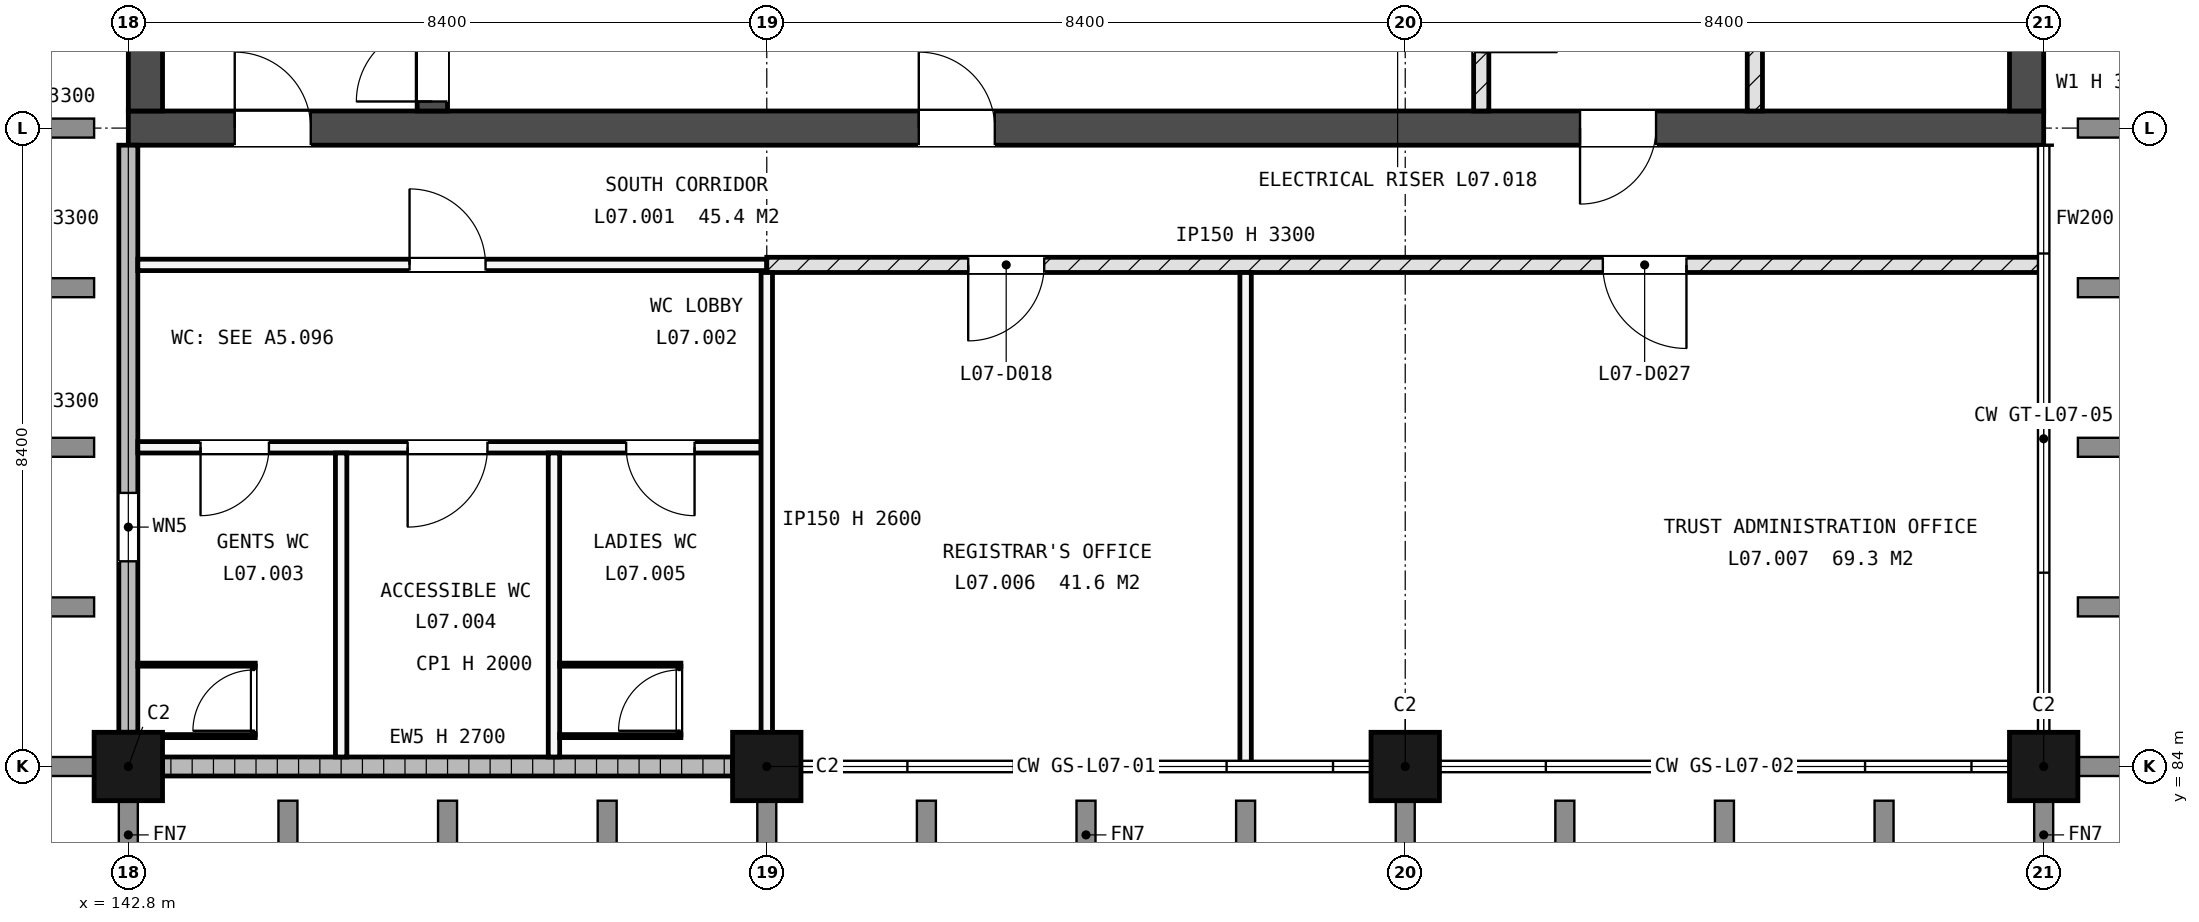
"""IFC4 building model, lengths in metres.
Left out: names, types, materials, properties, quantities, classifications, styles, units other than length and angle.
Written with IfcOpenShell. Run it as: python <this file> out.ifc"""

import sys

from ifc_helpers import new_model, si_unit, direction, frame, frame_2d, origin, origin_2d, place, context, subcontext, project, spatial, rectangle, extrude, element, fill, save


model = new_model("IFC4")
c1 = context("Model", 3, precision=1e-05, world=origin(), true_north=direction((0.0, 1.0)))
c2 = subcontext(c1, "Body", "Model", "MODEL_VIEW")
j1 = project(units=[si_unit("LENGTHUNIT", "METRE"), si_unit("PLANEANGLEUNIT", "RADIAN")], contexts=[c1])
p1 = place(None, origin())
s1 = spatial("IfcSite", under=j1, at=p1, CompositionType="ELEMENT")
p2 = place(p1, origin())
s2 = spatial("IfcBuilding", under=s1, at=p2, CompositionType="ELEMENT")
p3 = place(p2, frame((0.0, 0.0, 28.8)))
s3 = spatial("IfcBuildingStorey", under=s2, at=p3, CompositionType="ELEMENT", Elevation=28.8)
for number, where, z_axis, x_axis in (
    (1, (142.8, 84.0, -0.25), (0.0, 0.0, 1.0), (1.0, 0.0, 0.0)),
    (2, (151.2, 84.0, -0.25), (0.0, 0.0, 1.0), (1.0, 0.0, 0.0)),
    (3, (159.6, 84.0, -0.25), (0.0, 0.0, 1.0), (1.0, 0.0, 0.0)),
    (4, (168.0, 84.0, -0.25), (0.0, 0.0, 1.0), (1.0, 0.0, 0.0)),
):
    element("IfcColumn", number, at=place(p3, frame(where, z_axis=z_axis, x_axis=x_axis)), inside=s3, PredefinedType="COLUMN", context=c2, shape_type="SweptSolid", body=[
        extrude(rectangle(XDim=0.9, YDim=0.9, at=origin_2d()), origin(), (0.0, 0.0, 1.0), 3.6),
    ])
p4 = place(p3, frame((142.8, 92.4, -0.25), z_axis=(0.0, 0.0, 1.0), x_axis=(1.0, 0.0, 0.0)))
e5 = element("IfcWall", 5, at=p4, inside=s3, PredefinedType="SHEAR", context=c2, shape_type="SweptSolid", body=[
    extrude(rectangle(XDim=25.2, YDim=0.45, at=frame_2d((12.6, 0.0))), origin(), (0.0, 0.0, 1.0), 3.6),
])
p5 = place(p4, frame((1.4, 0.0, 0.25)))
e6 = element("IfcOpeningElement", 6, at=p5, cuts=e5, PredefinedType="OPENING", context=c2, shape_type="SweptSolid", body=[
    extrude(rectangle(XDim=1.0, YDim=2.1, at=frame_2d((0.5, 1.05))), frame((0.0, 0.235, 0.0), z_axis=(0.0, -1.0, 0.0), x_axis=(1.0, 0.0, 0.0)), (0.0, 0.0, 1.0), 0.47),
])
p6 = place(p4, frame((19.1, 0.0, 0.25)))
e7 = element("IfcOpeningElement", 7, at=p6, cuts=e5, PredefinedType="OPENING", context=c2, shape_type="SweptSolid", body=[
    extrude(rectangle(XDim=1.0, YDim=2.1, at=frame_2d((0.5, 1.05))), frame((0.0, 0.235, 0.0), z_axis=(0.0, -1.0, 0.0), x_axis=(1.0, 0.0, 0.0)), (0.0, 0.0, 1.0), 0.47),
])
p7 = place(p4, frame((10.4, 0.0, 0.25)))
e8 = element("IfcOpeningElement", 8, at=p7, cuts=e5, PredefinedType="OPENING", context=c2, shape_type="SweptSolid", body=[
    extrude(rectangle(XDim=1.0, YDim=2.1, at=frame_2d((0.5, 1.05))), frame((0.0, 0.235, 0.0), z_axis=(0.0, -1.0, 0.0), x_axis=(1.0, 0.0, 0.0)), (0.0, 0.0, 1.0), 0.47),
])
p8 = place(p3, frame((143.025, 92.625, -0.25), z_axis=(0.0, 0.0, 1.0), x_axis=(0.0, 1.0, 0.0)))
e9 = element("IfcWall", 9, at=p8, inside=s3, PredefinedType="SHEAR", context=c2, shape_type="SweptSolid", body=[
    extrude(rectangle(XDim=16.35, YDim=0.45, at=frame_2d((8.175, 0.0))), origin(), (0.0, 0.0, 1.0), 3.6),
])
p9 = place(p8, frame((2.975, 0.0, 1.85)))
e10 = element("IfcOpeningElement", 10, at=p9, cuts=e9, PredefinedType="OPENING", context=c2, shape_type="SweptSolid", body=[
    extrude(rectangle(XDim=1.2, YDim=0.9, at=frame_2d((0.6, 0.45))), frame((0.0, 0.235, 0.0), z_axis=(0.0, -1.0, 0.0), x_axis=(1.0, 0.0, 0.0)), (0.0, 0.0, 1.0), 0.47),
])
p10 = place(p3, frame((167.775, 92.625, -0.25), z_axis=(0.0, 0.0, 1.0), x_axis=(0.0, 1.0, 0.0)))
e11 = element("IfcWall", 11, at=p10, inside=s3, PredefinedType="SHEAR", context=c2, shape_type="SweptSolid", body=[
    extrude(rectangle(XDim=16.35, YDim=0.45, at=frame_2d((8.175, 0.0))), origin(), (0.0, 0.0, 1.0), 3.6),
])
p11 = place(p10, frame((12.175, 0.0, 1.85)))
e12 = element("IfcOpeningElement", 12, at=p11, cuts=e11, PredefinedType="OPENING", context=c2, shape_type="SweptSolid", body=[
    extrude(rectangle(XDim=1.2, YDim=0.9, at=frame_2d((0.6, 0.45))), frame((0.0, 0.235, 0.0), z_axis=(0.0, -1.0, 0.0), x_axis=(1.0, 0.0, 0.0)), (0.0, 0.0, 1.0), 0.47),
])
p12 = place(p3, frame((146.8, 92.625, -0.25), z_axis=(0.0, 0.0, 1.0), x_axis=(0.0, 1.0, 0.0)))
e13 = element("IfcWall", 13, at=p12, inside=s3, PredefinedType="SHEAR", context=c2, shape_type="SweptSolid", body=[
    extrude(rectangle(XDim=7.5, YDim=0.4, at=frame_2d((3.75, 0.0))), origin(), (0.0, 0.0, 1.0), 3.6),
])
p13 = place(p12, frame((0.125, 0.0, 0.25)))
e14 = element("IfcOpeningElement", 14, at=p13, cuts=e13, PredefinedType="OPENING", context=c2, shape_type="SweptSolid", body=[
    extrude(rectangle(XDim=1.0, YDim=2.1, at=frame_2d((0.5, 1.05))), frame((0.0, 0.21, 0.0), z_axis=(0.0, -1.0, 0.0), x_axis=(1.0, 0.0, 0.0)), (0.0, 0.0, 1.0), 0.42),
])
p14 = place(p3, frame((143.25, 84.0, 0.0), z_axis=(0.0, 0.0, 1.0), x_axis=(1.0, 0.0, 0.0)))
e15 = element("IfcWall", 15, at=p14, inside=s3, PredefinedType="STANDARD", context=c2, shape_type="SweptSolid", body=[
    extrude(rectangle(XDim=7.5, YDim=0.25, at=frame_2d((3.75, 0.0))), origin(), (0.0, 0.0, 1.0), 2.7),
])
p15 = place(p3, frame((142.8, 84.45, 0.0), z_axis=(0.0, 0.0, 1.0), x_axis=(0.0, 1.0, 0.0)))
e16 = element("IfcWall", 16, at=p15, inside=s3, PredefinedType="STANDARD", context=c2, shape_type="SweptSolid", body=[
    extrude(rectangle(XDim=7.725, YDim=0.25, at=frame_2d((3.863, 0.0))), origin(), (0.0, 0.0, 1.0), 3.3),
])
p16 = place(p15, frame((2.25, 0.0, 2.1)))
e17 = element("IfcOpeningElement", 17, at=p16, cuts=e16, PredefinedType="OPENING", context=c2, shape_type="SweptSolid", body=[
    extrude(rectangle(XDim=0.9, YDim=0.6, at=frame_2d((0.45, 0.3))), frame((0.0, 0.135, 0.0), z_axis=(0.0, -1.0, 0.0), x_axis=(1.0, 0.0, 0.0)), (0.0, 0.0, 1.0), 0.27),
])
p17 = place(p3, frame((142.925, 88.2, 0.0), z_axis=(0.0, 0.0, 1.0), x_axis=(1.0, 0.0, 0.0)))
e18 = element("IfcWall", 18, at=p17, inside=s3, PredefinedType="PARTITIONING", context=c2, shape_type="SweptSolid", body=[
    extrude(rectangle(XDim=8.2, YDim=0.15, at=frame_2d((4.1, 0.0))), origin(), (0.0, 0.0, 1.0), 3.3),
])
p18 = place(p17, frame((0.825, 0.0, 0.0)))
e19 = element("IfcOpeningElement", 19, at=p18, cuts=e18, PredefinedType="OPENING", context=c2, shape_type="SweptSolid", body=[
    extrude(rectangle(XDim=0.9, YDim=2.1, at=frame_2d((0.45, 1.05))), frame((0.0, 0.085, 0.0), z_axis=(0.0, -1.0, 0.0), x_axis=(1.0, 0.0, 0.0)), (0.0, 0.0, 1.0), 0.17),
])
p19 = place(p17, frame((3.55, 0.0, 0.0)))
e20 = element("IfcOpeningElement", 20, at=p19, cuts=e18, PredefinedType="OPENING", context=c2, shape_type="SweptSolid", body=[
    extrude(rectangle(XDim=1.05, YDim=2.25, at=frame_2d((0.525, 1.125))), frame((0.0, 0.085, 0.0), z_axis=(0.0, -1.0, 0.0), x_axis=(1.0, 0.0, 0.0)), (0.0, 0.0, 1.0), 0.17),
])
p20 = place(p17, frame((6.425, 0.0, 0.0)))
e21 = element("IfcOpeningElement", 21, at=p20, cuts=e18, PredefinedType="OPENING", context=c2, shape_type="SweptSolid", body=[
    extrude(rectangle(XDim=0.9, YDim=2.1, at=frame_2d((0.45, 1.05))), frame((0.0, 0.085, 0.0), z_axis=(0.0, -1.0, 0.0), x_axis=(1.0, 0.0, 0.0)), (0.0, 0.0, 1.0), 0.17),
])
p21 = place(p3, frame((142.925, 90.6, 0.0), z_axis=(0.0, 0.0, 1.0), x_axis=(1.0, 0.0, 0.0)))
e22 = element("IfcWall", 22, at=p21, inside=s3, PredefinedType="PARTITIONING", context=c2, shape_type="SweptSolid", body=[
    extrude(rectangle(XDim=8.275, YDim=0.15, at=frame_2d((4.137, 0.0))), origin(), (0.0, 0.0, 1.0), 3.3),
])
p22 = place(p21, frame((3.575, 0.0, 0.0)))
e23 = element("IfcOpeningElement", 23, at=p22, cuts=e22, PredefinedType="OPENING", context=c2, shape_type="SweptSolid", body=[
    extrude(rectangle(XDim=1.0, YDim=2.1, at=frame_2d((0.5, 1.05))), frame((0.0, 0.085, 0.0), z_axis=(0.0, -1.0, 0.0), x_axis=(1.0, 0.0, 0.0)), (0.0, 0.0, 1.0), 0.17),
])
p23 = place(p3, frame((151.2, 90.6, 0.0), z_axis=(0.0, 0.0, 1.0), x_axis=(1.0, 0.0, 0.0)))
e24 = element("IfcWall", 24, at=p23, inside=s3, PredefinedType="SOLIDWALL", context=c2, shape_type="SweptSolid", body=[
    extrude(rectangle(XDim=16.8, YDim=0.2, at=frame_2d((8.4, 0.0))), origin(), (0.0, 0.0, 1.0), 3.3),
])
p24 = place(p23, frame((2.65, 0.0, 0.0)))
e25 = element("IfcOpeningElement", 25, at=p24, cuts=e24, PredefinedType="OPENING", context=c2, shape_type="SweptSolid", body=[
    extrude(rectangle(XDim=1.0, YDim=2.1, at=frame_2d((0.5, 1.05))), frame((0.0, 0.11, 0.0), z_axis=(0.0, -1.0, 0.0), x_axis=(1.0, 0.0, 0.0)), (0.0, 0.0, 1.0), 0.22),
])
p25 = place(p23, frame((11.0, 0.0, 0.0)))
e26 = element("IfcOpeningElement", 26, at=p25, cuts=e24, PredefinedType="OPENING", context=c2, shape_type="SweptSolid", body=[
    extrude(rectangle(XDim=1.1, YDim=2.25, at=frame_2d((0.55, 1.125))), frame((0.0, 0.11, 0.0), z_axis=(0.0, -1.0, 0.0), x_axis=(1.0, 0.0, 0.0)), (0.0, 0.0, 1.0), 0.22),
])
for number, where, z_axis, x_axis in (
    (27, (145.6, 84.125, 0.0), (0.0, 0.0, 1.0), (0.0, 1.0, 0.0)),
    (28, (148.4, 84.125, 0.0), (0.0, 0.0, 1.0), (0.0, 1.0, 0.0)),
):
    element("IfcWall", number, at=place(p3, frame(where, z_axis=z_axis, x_axis=x_axis)), inside=s3, PredefinedType="PARTITIONING", context=c2, shape_type="SweptSolid", body=[
        extrude(rectangle(XDim=4.0, YDim=0.15, at=frame_2d((2.0, 0.0))), origin(), (0.0, 0.0, 1.0), 3.3),
    ])
p26 = place(p3, frame((151.2, 84.0, 0.0), z_axis=(0.0, 0.0, 1.0), x_axis=(0.0, 1.0, 0.0)))
e29 = element("IfcWall", 29, at=p26, inside=s3, PredefinedType="PARTITIONING", context=c2, shape_type="SweptSolid", body=[
    extrude(rectangle(XDim=6.5, YDim=0.15, at=frame_2d((3.25, 0.0))), origin(), (0.0, 0.0, 1.0), 2.6),
])
p27 = place(p3, frame((157.5, 84.0, 0.0), z_axis=(0.0, 0.0, 1.0), x_axis=(0.0, 1.0, 0.0)))
e30 = element("IfcWall", 30, at=p27, inside=s3, PredefinedType="PARTITIONING", context=c2, shape_type="SweptSolid", body=[
    extrude(rectangle(XDim=6.5, YDim=0.15, at=frame_2d((3.25, 0.0))), origin(), (0.0, 0.0, 1.0), 3.3),
])
p28 = place(p3, frame((160.6, 92.625, 0.0), z_axis=(0.0, 0.0, 1.0), x_axis=(0.0, 1.0, 0.0)))
e31 = element("IfcWall", 31, at=p28, inside=s3, PredefinedType="SOLIDWALL", context=c2, shape_type="SweptSolid", body=[
    extrude(rectangle(XDim=12.475, YDim=0.2, at=frame_2d((6.238, 0.0))), origin(), (0.0, 0.0, 1.0), 3.3),
])
p29 = place(p28, frame((5.075, 0.0, 0.0)))
e32 = element("IfcOpeningElement", 32, at=p29, cuts=e31, PredefinedType="OPENING", context=c2, shape_type="SweptSolid", body=[
    extrude(rectangle(XDim=0.8, YDim=2.1, at=frame_2d((0.4, 1.05))), frame((0.0, 0.11, 0.0), z_axis=(0.0, -1.0, 0.0), x_axis=(1.0, 0.0, 0.0)), (0.0, 0.0, 1.0), 0.22),
])
p30 = place(p28, frame((0.775, 0.0, 0.0)))
e33 = element("IfcOpeningElement", 33, at=p30, cuts=e31, PredefinedType="OPENING", context=c2, shape_type="SweptSolid", body=[
    extrude(rectangle(XDim=1.0, YDim=2.1, at=frame_2d((0.5, 1.05))), frame((0.0, 0.11, 0.0), z_axis=(0.0, -1.0, 0.0), x_axis=(1.0, 0.0, 0.0)), (0.0, 0.0, 1.0), 0.22),
])
p31 = place(p3, frame((164.2, 92.625, 0.0), z_axis=(0.0, 0.0, 1.0), x_axis=(0.0, 1.0, 0.0)))
e34 = element("IfcWall", 34, at=p31, inside=s3, PredefinedType="SOLIDWALL", context=c2, shape_type="SweptSolid", body=[
    extrude(rectangle(XDim=8.725, YDim=0.2, at=frame_2d((4.363, 0.0))), origin(), (0.0, 0.0, 1.0), 3.3),
])
p32 = place(p31, frame((1.675, 0.0, 0.0)))
e35 = element("IfcOpeningElement", 35, at=p32, cuts=e34, PredefinedType="OPENING", context=c2, shape_type="SweptSolid", body=[
    extrude(rectangle(XDim=0.8, YDim=2.1, at=frame_2d((0.4, 1.05))), frame((0.0, 0.11, 0.0), z_axis=(0.0, -1.0, 0.0), x_axis=(1.0, 0.0, 0.0)), (0.0, 0.0, 1.0), 0.22),
])
p33 = place(p31, frame((6.275, 0.0, 0.0)))
e36 = element("IfcOpeningElement", 36, at=p33, cuts=e34, PredefinedType="OPENING", context=c2, shape_type="SweptSolid", body=[
    extrude(rectangle(XDim=0.8, YDim=2.1, at=frame_2d((0.4, 1.05))), frame((0.0, 0.11, 0.0), z_axis=(0.0, -1.0, 0.0), x_axis=(1.0, 0.0, 0.0)), (0.0, 0.0, 1.0), 0.22),
])
p34 = place(p3, frame((142.93, 84.4, 0.0), z_axis=(0.0, 0.0, 1.0), x_axis=(1.0, 0.0, 0.0)))
e37 = element("IfcWall", 37, at=p34, inside=s3, PredefinedType="PARTITIONING", context=c2, shape_type="SweptSolid", body=[
    extrude(rectangle(XDim=1.54, YDim=0.04, at=frame_2d((0.77, 0.0))), origin(), (0.0, 0.0, 1.0), 2.0),
])
p35 = place(p3, frame((142.925, 85.34, 0.0), z_axis=(0.0, 0.0, 1.0), x_axis=(1.0, 0.0, 0.0)))
e38 = element("IfcWall", 38, at=p35, inside=s3, PredefinedType="PARTITIONING", context=c2, shape_type="SweptSolid", body=[
    extrude(rectangle(XDim=1.545, YDim=0.04, at=frame_2d((0.772, 0.0))), origin(), (0.0, 0.0, 1.0), 2.0),
])
p36 = place(p3, frame((144.45, 84.42, 0.0), z_axis=(0.0, 0.0, 1.0), x_axis=(0.0, 1.0, 0.0)))
e39 = element("IfcWall", 39, at=p36, inside=s3, PredefinedType="PARTITIONING", context=c2, shape_type="SweptSolid", body=[
    extrude(rectangle(XDim=0.9, YDim=0.04, at=frame_2d((0.45, 0.0))), origin(), (0.0, 0.0, 1.0), 2.0),
])
p37 = place(p36, frame((0.05, 0.0, 0.0)))
e40 = element("IfcOpeningElement", 40, at=p37, cuts=e39, PredefinedType="OPENING", context=c2, shape_type="SweptSolid", body=[
    extrude(rectangle(XDim=0.8, YDim=2.0, at=frame_2d((0.4, 1.0))), frame((0.0, 0.03, 0.0), z_axis=(0.0, -1.0, 0.0), x_axis=(1.0, 0.0, 0.0)), (0.0, 0.0, 1.0), 0.06),
])
for number, where, z_axis, x_axis in (
    (41, (148.475, 84.4, 0.0), (0.0, 0.0, 1.0), (1.0, 0.0, 0.0)),
    (42, (148.475, 85.34, 0.0), (0.0, 0.0, 1.0), (1.0, 0.0, 0.0)),
):
    element("IfcWall", number, at=place(p3, frame(where, z_axis=z_axis, x_axis=x_axis)), inside=s3, PredefinedType="PARTITIONING", context=c2, shape_type="SweptSolid", body=[
        extrude(rectangle(XDim=1.595, YDim=0.04, at=frame_2d((0.797, 0.0))), origin(), (0.0, 0.0, 1.0), 2.0),
    ])
p38 = place(p3, frame((150.05, 84.42, 0.0), z_axis=(0.0, 0.0, 1.0), x_axis=(0.0, 1.0, 0.0)))
e43 = element("IfcWall", 43, at=p38, inside=s3, PredefinedType="PARTITIONING", context=c2, shape_type="SweptSolid", body=[
    extrude(rectangle(XDim=0.9, YDim=0.04, at=frame_2d((0.45, 0.0))), origin(), (0.0, 0.0, 1.0), 2.0),
])
p39 = place(p38, frame((0.05, 0.0, 0.0)))
e44 = element("IfcOpeningElement", 44, at=p39, cuts=e43, PredefinedType="OPENING", context=c2, shape_type="SweptSolid", body=[
    extrude(rectangle(XDim=0.8, YDim=2.0, at=frame_2d((0.4, 1.0))), frame((0.0, 0.03, 0.0), z_axis=(0.0, -1.0, 0.0), x_axis=(1.0, 0.0, 0.0)), (0.0, 0.0, 1.0), 0.06),
])
p40 = place(p16, origin())
e45 = element("IfcWindow", 45, at=p40, inside=s3, PartitioningType="SINGLE_PANEL", PredefinedType="WINDOW", context=c2, shape_type="SweptSolid", body=[
    extrude(rectangle(XDim=0.9, YDim=0.6, at=frame_2d((0.45, 0.3))), frame((0.0, 0.03, 0.0), z_axis=(0.0, -1.0, 0.0), x_axis=(1.0, 0.0, 0.0)), (0.0, 0.0, 1.0), 0.06),
])
fill(e17, e45)
p41 = place(p5, origin())
e46 = element("IfcDoor", 46, at=p41, inside=s3, OperationType="SINGLE_SWING_RIGHT", PredefinedType="DOOR", context=c2, shape_type="SweptSolid", body=[
    extrude(rectangle(XDim=1.0, YDim=2.1, at=frame_2d((0.5, 1.05))), frame((0.0, 0.025, 0.0), z_axis=(0.0, -1.0, 0.0), x_axis=(1.0, 0.0, 0.0)), (0.0, 0.0, 1.0), 0.05),
])
fill(e6, e46)
p42 = place(p13, origin())
e47 = element("IfcDoor", 47, at=p42, inside=s3, OperationType="SINGLE_SWING_RIGHT", PredefinedType="DOOR", context=c2, shape_type="SweptSolid", body=[
    extrude(rectangle(XDim=1.0, YDim=2.1, at=frame_2d((0.5, 1.05))), frame((0.0, 0.025, 0.0), z_axis=(0.0, -1.0, 0.0), x_axis=(1.0, 0.0, 0.0)), (0.0, 0.0, 1.0), 0.05),
])
fill(e14, e47)
p43 = place(p18, origin())
e48 = element("IfcDoor", 48, at=p43, inside=s3, OperationType="SINGLE_SWING_LEFT", PredefinedType="DOOR", context=c2, shape_type="SweptSolid", body=[
    extrude(rectangle(XDim=0.9, YDim=2.1, at=frame_2d((0.45, 1.05))), frame((0.0, 0.025, 0.0), z_axis=(0.0, -1.0, 0.0), x_axis=(1.0, 0.0, 0.0)), (0.0, 0.0, 1.0), 0.05),
])
fill(e19, e48)
p44 = place(p19, origin())
e49 = element("IfcDoor", 49, at=p44, inside=s3, OperationType="SINGLE_SWING_LEFT", PredefinedType="DOOR", context=c2, shape_type="SweptSolid", body=[
    extrude(rectangle(XDim=1.05, YDim=2.25, at=frame_2d((0.525, 1.125))), frame((0.0, 0.025, 0.0), z_axis=(0.0, -1.0, 0.0), x_axis=(1.0, 0.0, 0.0)), (0.0, 0.0, 1.0), 0.05),
])
fill(e20, e49)
p45 = place(p20, origin())
e50 = element("IfcDoor", 50, at=p45, inside=s3, OperationType="SINGLE_SWING_RIGHT", PredefinedType="DOOR", context=c2, shape_type="SweptSolid", body=[
    extrude(rectangle(XDim=0.9, YDim=2.1, at=frame_2d((0.45, 1.05))), frame((0.0, 0.025, 0.0), z_axis=(0.0, -1.0, 0.0), x_axis=(1.0, 0.0, 0.0)), (0.0, 0.0, 1.0), 0.05),
])
fill(e21, e50)
p46 = place(p24, origin())
e51 = element("IfcDoor", 51, at=p46, inside=s3, OperationType="SINGLE_SWING_LEFT", PredefinedType="DOOR", context=c2, shape_type="SweptSolid", body=[
    extrude(rectangle(XDim=1.0, YDim=2.1, at=frame_2d((0.5, 1.05))), frame((0.0, 0.025, 0.0), z_axis=(0.0, -1.0, 0.0), x_axis=(1.0, 0.0, 0.0)), (0.0, 0.0, 1.0), 0.05),
])
fill(e25, e51)
p47 = place(p25, origin())
e52 = element("IfcDoor", 52, at=p47, inside=s3, OperationType="SINGLE_SWING_RIGHT", PredefinedType="DOOR", context=c2, shape_type="SweptSolid", body=[
    extrude(rectangle(XDim=1.1, YDim=2.25, at=frame_2d((0.55, 1.125))), frame((0.0, 0.025, 0.0), z_axis=(0.0, -1.0, 0.0), x_axis=(1.0, 0.0, 0.0)), (0.0, 0.0, 1.0), 0.05),
])
fill(e26, e52)
p48 = place(p22, origin())
e53 = element("IfcDoor", 53, at=p48, inside=s3, OperationType="SINGLE_SWING_RIGHT", PredefinedType="DOOR", context=c2, shape_type="SweptSolid", body=[
    extrude(rectangle(XDim=1.0, YDim=2.1, at=frame_2d((0.5, 1.05))), frame((0.0, 0.025, 0.0), z_axis=(0.0, -1.0, 0.0), x_axis=(1.0, 0.0, 0.0)), (0.0, 0.0, 1.0), 0.05),
])
fill(e23, e53)
p49 = place(p6, origin())
e54 = element("IfcDoor", 54, at=p49, inside=s3, OperationType="SINGLE_SWING_LEFT", PredefinedType="DOOR", context=c2, shape_type="SweptSolid", body=[
    extrude(rectangle(XDim=1.0, YDim=2.1, at=frame_2d((0.5, 1.05))), frame((0.0, 0.025, 0.0), z_axis=(0.0, -1.0, 0.0), x_axis=(1.0, 0.0, 0.0)), (0.0, 0.0, 1.0), 0.05),
])
fill(e7, e54)
p50 = place(p7, origin())
e55 = element("IfcDoor", 55, at=p50, inside=s3, OperationType="SINGLE_SWING_RIGHT", PredefinedType="DOOR", context=c2, shape_type="SweptSolid", body=[
    extrude(rectangle(XDim=1.0, YDim=2.1, at=frame_2d((0.5, 1.05))), frame((0.0, 0.025, 0.0), z_axis=(0.0, -1.0, 0.0), x_axis=(1.0, 0.0, 0.0)), (0.0, 0.0, 1.0), 0.05),
])
fill(e8, e55)
p51 = place(p37, origin())
e56 = element("IfcDoor", 56, at=p51, inside=s3, OperationType="SINGLE_SWING_LEFT", PredefinedType="DOOR", context=c2, shape_type="SweptSolid", body=[
    extrude(rectangle(XDim=0.8, YDim=2.0, at=frame_2d((0.4, 1.0))), frame((0.0, 0.02, 0.0), z_axis=(0.0, -1.0, 0.0), x_axis=(1.0, 0.0, 0.0)), (0.0, 0.0, 1.0), 0.04),
])
fill(e40, e56)
p52 = place(p39, origin())
e57 = element("IfcDoor", 57, at=p52, inside=s3, OperationType="SINGLE_SWING_LEFT", PredefinedType="DOOR", context=c2, shape_type="SweptSolid", body=[
    extrude(rectangle(XDim=0.8, YDim=2.0, at=frame_2d((0.4, 1.0))), frame((0.0, 0.02, 0.0), z_axis=(0.0, -1.0, 0.0), x_axis=(1.0, 0.0, 0.0)), (0.0, 0.0, 1.0), 0.04),
])
fill(e44, e57)
save(model, sys.argv[1])
